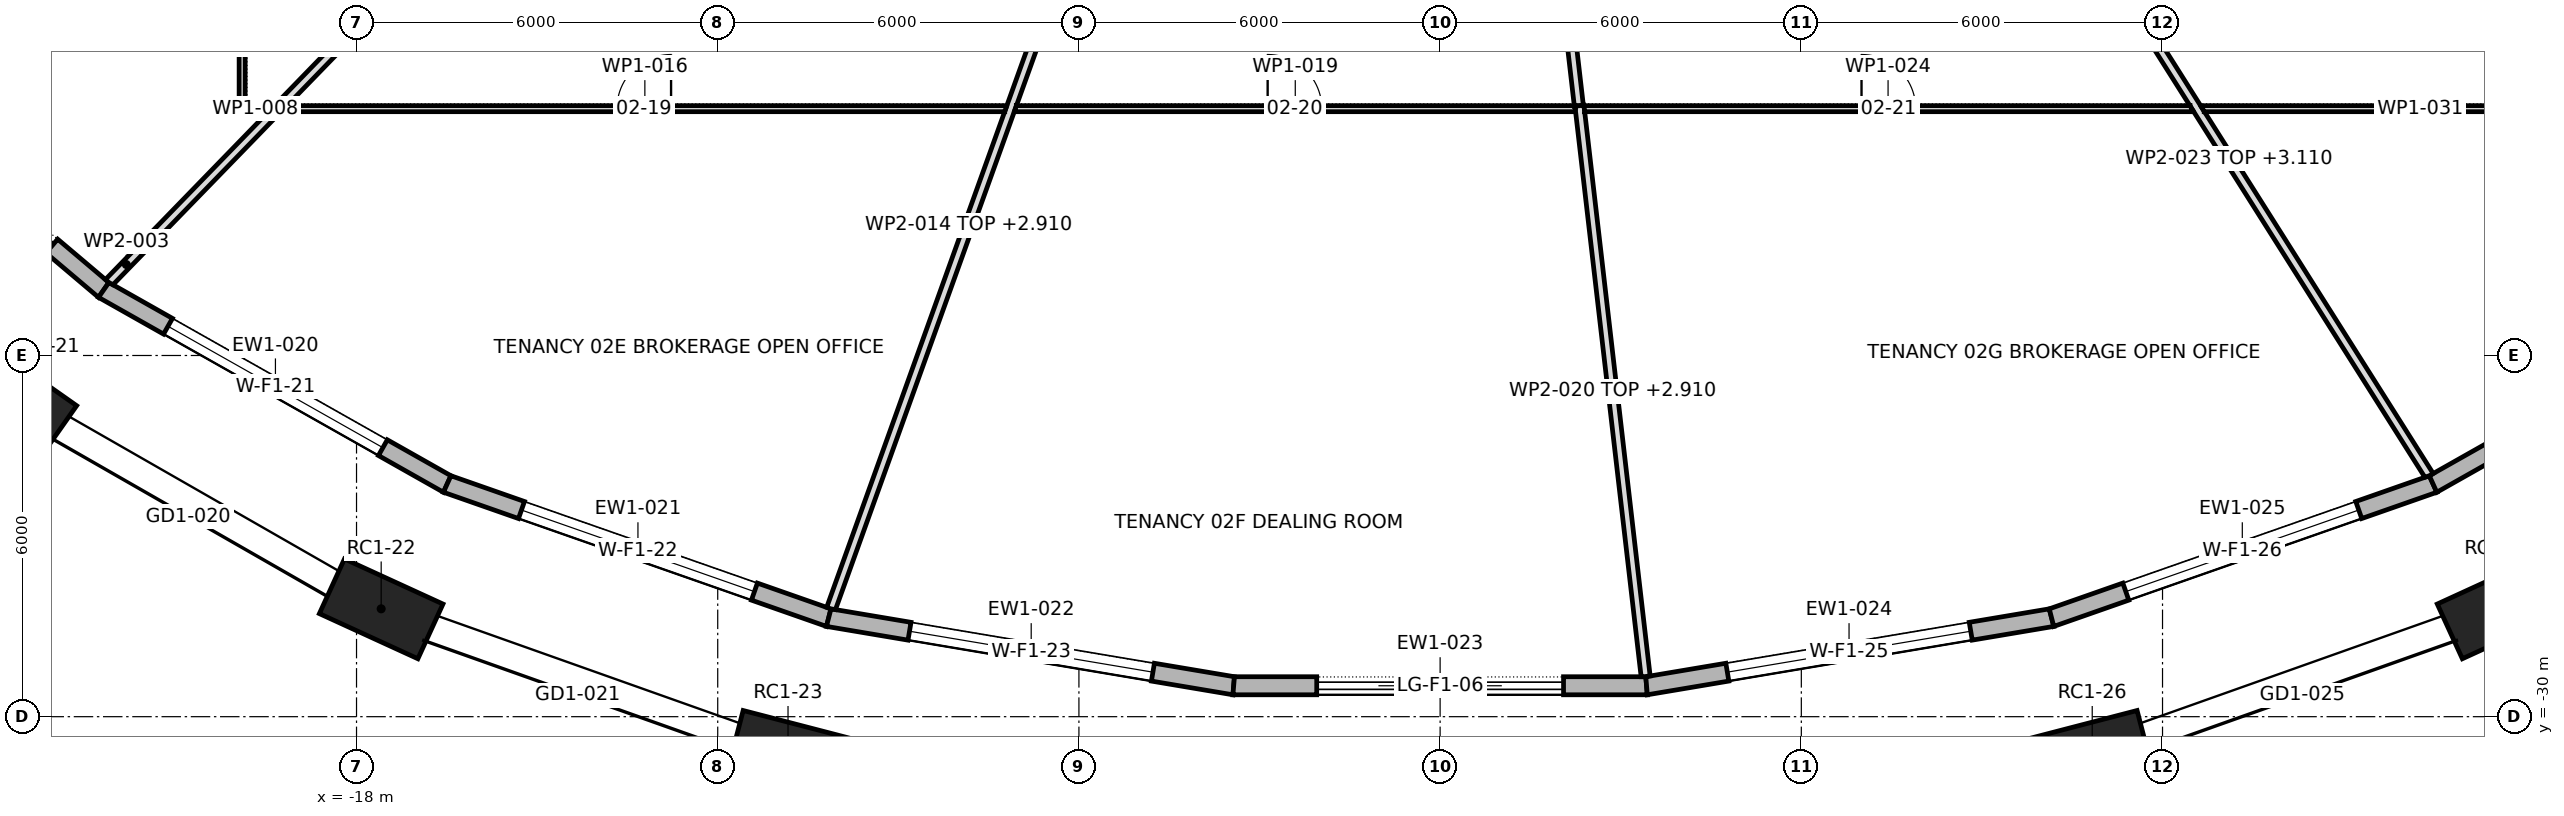
"""IFC4 building model, lengths in metres.
Left out: names, types, materials, properties, quantities, classifications, styles, units other than length and angle.
Written with IfcOpenShell. Run it as: python <this file> out.ifc"""

import sys

from ifc_helpers import new_model, si_unit, direction, frame, frame_2d, origin, origin_2d, place, context, subcontext, project, spatial, polyline, rectangle, outline, extrude, element, fill, save


model = new_model("IFC4")
c1 = context("Model", 3, precision=1e-05, world=origin(), true_north=direction((0.0, 1.0)))
c2 = subcontext(c1, "Body", "Model", "MODEL_VIEW")
j1 = project(units=[si_unit("LENGTHUNIT", "METRE"), si_unit("PLANEANGLEUNIT", "RADIAN")], contexts=[c1])
p1 = place(None, origin())
s1 = spatial("IfcSite", under=j1, at=p1, CompositionType="ELEMENT")
p2 = place(p1, origin())
s2 = spatial("IfcBuilding", under=s1, at=p2, CompositionType="ELEMENT")
p3 = place(p2, frame((0.0, 0.0, 44.5)))
s3 = spatial("IfcBuildingStorey", under=s2, at=p3, CompositionType="ELEMENT", Elevation=44.5)
for number, where, z_axis, x_axis in (
    (1, (-23.673, -24.725, 0.0), (0.0, 0.0, 1.0), (0.818, -0.575, 0.0)),
    (2, (-17.591, -28.208, 0.0), (0.0, 0.0, 1.0), (0.909, -0.417, 0.0)),
    (3, (-10.832, -30.608, 0.0), (0.0, 0.0, 1.0), (0.968, -0.252, 0.0)),
    (4, (10.832, -30.608, 0.0), (0.0, 0.0, 1.0), (0.968, 0.252, 0.0)),
    (5, (17.591, -28.208, 0.0), (0.0, 0.0, 1.0), (0.909, 0.417, 0.0)),
):
    element("IfcColumn", number, at=place(p3, frame(where, z_axis=z_axis, x_axis=x_axis)), inside=s3, PredefinedType="COLUMN", context=c2, shape_type="SweptSolid", body=[
        extrude(rectangle(XDim=1.8, YDim=1.0, at=origin_2d()), origin(), (0.0, 0.0, 1.0), 4.2),
    ])
p4 = place(p3, frame((-27.054, -18.806, 0.0), z_axis=(0.0, 0.0, 1.0), x_axis=(0.763577077796, -0.645716691951, 0.0)))
e6 = element("IfcWall", 6, at=p4, inside=s3, PredefinedType="STANDARD", context=c2, shape_type="SweptSolid", body=[
    extrude(outline(polyline([(-0.015, -0.15), (6.371, -0.15), (6.343, 0.15), (0.015, 0.15), (-0.015, -0.15)])), origin(), (0.0, 0.0, 1.0), 3.9),
])
p5 = place(p4, frame((1.129, 0.0, 0.0)))
e7 = element("IfcOpeningElement", 7, at=p5, cuts=e6, PredefinedType="OPENING", context=c2, shape_type="SweptSolid", body=[
    extrude(rectangle(XDim=4.1, YDim=3.45, at=frame_2d((2.05, 1.725))), frame((0.0, 0.162, 0.0), z_axis=(0.0, -1.0, 0.0), x_axis=(1.0, 0.0, 0.0)), (0.0, 0.0, 1.0), 0.324),
])
p6 = place(p3, frame((-22.2, -22.911, 0.0), z_axis=(0.0, 0.0, 1.0), x_axis=(0.87061279013, -0.491968870623, 0.0)))
e8 = element("IfcWall", 8, at=p6, inside=s3, PredefinedType="STANDARD", context=c2, shape_type="SweptSolid", body=[
    extrude(outline(polyline([(-0.014, -0.15), (6.567, -0.15), (6.54, 0.15), (0.014, 0.15), (-0.014, -0.15)])), origin(), (0.0, 0.0, 1.0), 3.9),
])
p7 = place(p6, frame((1.227, 0.0, 0.6)))
e9 = element("IfcOpeningElement", 9, at=p7, cuts=e8, PredefinedType="OPENING", context=c2, shape_type="SweptSolid", body=[
    extrude(rectangle(XDim=4.1, YDim=2.85, at=frame_2d((2.05, 1.425))), frame((0.0, 0.162, 0.0), z_axis=(0.0, -1.0, 0.0), x_axis=(1.0, 0.0, 0.0)), (0.0, 0.0, 1.0), 0.324),
])
p8 = place(p3, frame((-16.494, -26.135, 0.0), z_axis=(0.0, 0.0, 1.0), x_axis=(0.943778979427, -0.330577128657, 0.0)))
e10 = element("IfcWall", 10, at=p8, inside=s3, PredefinedType="STANDARD", context=c2, shape_type="SweptSolid", body=[
    extrude(outline(polyline([(-0.013, -0.15), (6.728, -0.15), (6.703, 0.15), (0.013, 0.15), (-0.013, -0.15)])), origin(), (0.0, 0.0, 1.0), 3.9),
])
p9 = place(p8, frame((1.308, 0.0, 0.6)))
e11 = element("IfcOpeningElement", 11, at=p9, cuts=e10, PredefinedType="OPENING", context=c2, shape_type="SweptSolid", body=[
    extrude(rectangle(XDim=4.1, YDim=2.85, at=frame_2d((2.05, 1.425))), frame((0.0, 0.162, 0.0), z_axis=(0.0, -1.0, 0.0), x_axis=(1.0, 0.0, 0.0)), (0.0, 0.0, 1.0), 0.324),
])
p10 = place(p3, frame((-10.156, -28.355, 0.0), z_axis=(0.0, 0.0, 1.0), x_axis=(0.986145179906, -0.165884550659, 0.0)))
e12 = element("IfcWall", 12, at=p10, inside=s3, PredefinedType="STANDARD", context=c2, shape_type="SweptSolid", body=[
    extrude(outline(polyline([(-0.013, -0.15), (6.834, -0.15), (6.809, 0.15), (0.013, 0.15), (-0.013, -0.15)])), origin(), (0.0, 0.0, 1.0), 3.9),
])
p11 = place(p10, frame((1.361, 0.0, 0.6)))
e13 = element("IfcOpeningElement", 13, at=p11, cuts=e12, PredefinedType="OPENING", context=c2, shape_type="SweptSolid", body=[
    extrude(rectangle(XDim=4.1, YDim=2.85, at=frame_2d((2.05, 1.425))), frame((0.0, 0.162, 0.0), z_axis=(0.0, -1.0, 0.0), x_axis=(1.0, 0.0, 0.0)), (0.0, 0.0, 1.0), 0.324),
])
p12 = place(p3, frame((-3.429, -29.486, 0.0), z_axis=(0.0, 0.0, 1.0), x_axis=(1.0, 0.0, 0.0)))
e14 = element("IfcWall", 14, at=p12, inside=s3, PredefinedType="STANDARD", context=c2, shape_type="SweptSolid", body=[
    extrude(outline(polyline([(-0.012, -0.15), (6.871, -0.15), (6.846, 0.15), (0.012, 0.15), (-0.012, -0.15)])), origin(), (0.0, 0.0, 1.0), 3.9),
])
p13 = place(p12, frame((1.379, 0.0, 0.0)))
e15 = element("IfcOpeningElement", 15, at=p13, cuts=e14, PredefinedType="OPENING", context=c2, shape_type="SweptSolid", body=[
    extrude(rectangle(XDim=4.1, YDim=3.45, at=frame_2d((2.05, 1.725))), frame((0.0, 0.162, 0.0), z_axis=(0.0, -1.0, 0.0), x_axis=(1.0, 0.0, 0.0)), (0.0, 0.0, 1.0), 0.324),
])
p14 = place(p3, frame((3.429, -29.486, 0.0), z_axis=(0.0, 0.0, 1.0), x_axis=(0.986145179906, 0.165884550659, 0.0)))
e16 = element("IfcWall", 16, at=p14, inside=s3, PredefinedType="STANDARD", context=c2, shape_type="SweptSolid", body=[
    extrude(outline(polyline([(-0.012, -0.15), (6.834, -0.15), (6.809, 0.15), (0.012, 0.15), (-0.012, -0.15)])), origin(), (0.0, 0.0, 1.0), 3.9),
])
p15 = place(p14, frame((1.361, 0.0, 0.6)))
e17 = element("IfcOpeningElement", 17, at=p15, cuts=e16, PredefinedType="OPENING", context=c2, shape_type="SweptSolid", body=[
    extrude(rectangle(XDim=4.1, YDim=2.85, at=frame_2d((2.05, 1.425))), frame((0.0, 0.162, 0.0), z_axis=(0.0, -1.0, 0.0), x_axis=(1.0, 0.0, 0.0)), (0.0, 0.0, 1.0), 0.324),
])
p16 = place(p3, frame((10.156, -28.355, 0.0), z_axis=(0.0, 0.0, 1.0), x_axis=(0.943778979427, 0.330577128657, 0.0)))
e18 = element("IfcWall", 18, at=p16, inside=s3, PredefinedType="STANDARD", context=c2, shape_type="SweptSolid", body=[
    extrude(outline(polyline([(-0.013, -0.15), (6.729, -0.15), (6.702, 0.15), (0.013, 0.15), (-0.013, -0.15)])), origin(), (0.0, 0.0, 1.0), 3.9),
])
p17 = place(p16, frame((1.308, 0.0, 0.6)))
e19 = element("IfcOpeningElement", 19, at=p17, cuts=e18, PredefinedType="OPENING", context=c2, shape_type="SweptSolid", body=[
    extrude(rectangle(XDim=4.1, YDim=2.85, at=frame_2d((2.05, 1.425))), frame((0.0, 0.162, 0.0), z_axis=(0.0, -1.0, 0.0), x_axis=(1.0, 0.0, 0.0)), (0.0, 0.0, 1.0), 0.324),
])
p18 = place(p3, frame((16.494, -26.135, 0.0), z_axis=(0.0, 0.0, 1.0), x_axis=(0.87061279013, 0.491968870623, 0.0)))
e20 = element("IfcWall", 20, at=p18, inside=s3, PredefinedType="STANDARD", context=c2, shape_type="SweptSolid", body=[
    extrude(outline(polyline([(-0.013, -0.15), (6.568, -0.15), (6.539, 0.15), (0.013, 0.15), (-0.013, -0.15)])), origin(), (0.0, 0.0, 1.0), 3.9),
])
p19 = place(p18, frame((1.227, 0.0, 0.6)))
e21 = element("IfcOpeningElement", 21, at=p19, cuts=e20, PredefinedType="OPENING", context=c2, shape_type="SweptSolid", body=[
    extrude(rectangle(XDim=4.1, YDim=2.85, at=frame_2d((2.05, 1.425))), frame((0.0, 0.162, 0.0), z_axis=(0.0, -1.0, 0.0), x_axis=(1.0, 0.0, 0.0)), (0.0, 0.0, 1.0), 0.324),
])
p20 = place(p3, frame((-22.117, -22.791, 0.0), z_axis=(0.0, 0.0, 1.0), x_axis=(0.696613128163, 0.717446966452, 0.0)))
e22 = element("IfcWall", 22, at=p20, inside=s3, PredefinedType="PARTITIONING", context=c2, shape_type="SweptSolid", body=[
    extrude(outline(polyline([(0.0, 0.075), (0.0, 0.071), (0.005, 0.0), (0.025, -0.075), (0.832, -0.075), (0.832, 0.075), (0.0, 0.075)])), origin(), (0.0, 0.0, 1.0), 3.9),
])
p21 = place(p3, frame((-19.9, -19.95, 0.0), z_axis=(0.0, 0.0, 1.0), x_axis=(0.0, 1.0, 0.0)))
e23 = element("IfcWall", 23, at=p21, inside=s3, PredefinedType="PARTITIONING", context=c2, shape_type="SweptSolid", body=[
    extrude(outline(polyline([(10.9, -0.05), (10.9, -0.049), (10.892, -0.031), (10.883, -0.034), (10.845, 0.05), (9.038, 0.05), (7.23, 0.05), (5.423, 0.05), (3.615, 0.05), (1.808, 0.05), (0.0, 0.05), (0.1, -0.05), (0.1, -0.05), (1.9, -0.05), (3.7, -0.05), (5.5, -0.05), (7.3, -0.05), (9.1, -0.05), (10.9, -0.05)])), origin(), (0.0, 0.0, 1.0), 3.9),
])
p22 = place(p21, frame((5.05, 0.0, 0.0)))
e24 = element("IfcOpeningElement", 24, at=p22, cuts=e23, PredefinedType="OPENING", context=c2, shape_type="SweptSolid", body=[
    extrude(rectangle(XDim=0.9, YDim=2.1, at=frame_2d((0.45, 1.05))), frame((0.0, 0.062, 0.0), z_axis=(0.0, -1.0, 0.0), x_axis=(1.0, 0.0, 0.0)), (0.0, 0.0, 1.0), 0.124),
])
p23 = place(p3, frame((-19.46, -19.9, 0.0), z_axis=(0.0, 0.0, 1.0), x_axis=(-1.0, 0.0, 0.0)))
e25 = element("IfcWall", 25, at=p23, inside=s3, PredefinedType="PARTITIONING", context=c2, shape_type="SweptSolid", body=[
    extrude(outline(polyline([(0.0, -0.05), (0.39, -0.05), (0.49, 0.05), (0.0, 0.05), (0.0, -0.05)])), origin(), (0.0, 0.0, 1.0), 3.9),
])
p24 = place(p3, frame((-10.119, -28.209, 0.0), z_axis=(0.0, 0.0, 1.0), x_axis=(0.337949016046, 0.941164418448, 0.0)))
e26 = element("IfcWall", 26, at=p24, inside=s3, PredefinedType="PARTITIONING", context=c2, shape_type="SweptSolid", body=[
    extrude(outline(polyline([(0.014, -0.075), (1.792, -0.075), (3.57, -0.075), (5.347, -0.075), (7.125, -0.075), (8.903, -0.075), (8.908, -0.073), (8.909, -0.075), (10.458, -0.075), (12.008, -0.075), (13.557, -0.075), (13.557, -0.074), (13.555, -0.069), (13.555, -0.069), (13.503, 0.075), (11.919, 0.075), (10.335, 0.075), (8.751, 0.075), (8.749, 0.074), (8.749, 0.075), (6.999, 0.075), (5.249, 0.075), (3.5, 0.075), (1.75, 0.075), (0.0, 0.075), (0.0, 0.071), (0.0, -0.0), (0.014, -0.075)])), origin(), (0.0, 0.0, 1.0), 2.91),
])
p25 = place(p3, frame((-7.198, -19.9, 0.0), z_axis=(0.0, 0.0, 1.0), x_axis=(-1.0, 0.0, 0.0)))
e27 = element("IfcWall", 27, at=p25, inside=s3, PredefinedType="PARTITIONING", context=c2, shape_type="SweptSolid", body=[
    extrude(outline(polyline([(0.0, -0.05), (1.993, -0.05), (3.986, -0.05), (5.979, -0.05), (7.972, -0.05), (9.965, -0.05), (11.958, -0.05), (12.055, 0.05), (12.055, 0.05), (10.338, 0.05), (8.621, 0.05), (6.904, 0.05), (5.187, 0.05), (3.47, 0.05), (1.753, 0.05), (0.035, 0.05), (0.0, -0.049), (0.0, -0.05)])), origin(), (0.0, 0.0, 1.0), 3.9),
])
p26 = place(p25, frame((5.577, 0.0, 0.0)))
e28 = element("IfcOpeningElement", 28, at=p26, cuts=e27, PredefinedType="OPENING", context=c2, shape_type="SweptSolid", body=[
    extrude(rectangle(XDim=0.9, YDim=2.1, at=frame_2d((0.45, 1.05))), frame((0.0, 0.062, 0.0), z_axis=(0.0, -1.0, 0.0), x_axis=(1.0, 0.0, 0.0)), (0.0, 0.0, 1.0), 0.124),
])
p27 = place(p3, frame((1.798, -15.467, 0.0), z_axis=(0.0, 0.0, 1.0), x_axis=(0.114783679138, -0.993390510828, 0.0)))
e29 = element("IfcWall", 29, at=p27, inside=s3, PredefinedType="PARTITIONING", context=c2, shape_type="SweptSolid", body=[
    extrude(outline(polyline([(0.0, -0.075), (1.468, -0.075), (2.936, -0.075), (4.404, -0.075), (4.404, -0.075), (4.407, -0.075), (4.413, -0.075), (4.413, 0.075), (2.948, 0.075), (1.483, 0.075), (0.017, 0.075), (0.0, -0.073), (0.0, -0.075)])), origin(), (0.0, 0.0, 1.0), 2.91),
])
p28 = place(p3, frame((2.25, -19.9, 0.0), z_axis=(0.0, 0.0, 1.0), x_axis=(-1.0, 0.0, 0.0)))
e30 = element("IfcWall", 30, at=p28, inside=s3, PredefinedType="PARTITIONING", context=c2, shape_type="SweptSolid", body=[
    extrude(outline(polyline([(0.021, -0.05), (1.875, -0.05), (3.728, -0.05), (5.581, -0.05), (7.435, -0.05), (9.288, -0.05), (9.324, 0.05), (9.324, 0.05), (7.459, 0.05), (5.594, 0.05), (3.729, 0.05), (1.865, 0.05), (0.0, 0.05), (0.0, 0.047), (0.01, -0.041), (0.0, -0.042), (0.0, -0.043), (0.02, -0.041), (0.021, -0.05)])), origin(), (0.0, 0.0, 1.0), 3.9),
])
p29 = place(p28, frame((4.215, 0.0, 0.0)))
e31 = element("IfcOpeningElement", 31, at=p29, cuts=e30, PredefinedType="OPENING", context=c2, shape_type="SweptSolid", body=[
    extrude(rectangle(XDim=0.9, YDim=2.1, at=frame_2d((0.45, 1.05))), frame((0.0, 0.062, 0.0), z_axis=(0.0, -1.0, 0.0), x_axis=(1.0, 0.0, 0.0)), (0.0, 0.0, 1.0), 0.124),
])
p30 = place(p3, frame((2.314, -19.85, 0.0), z_axis=(0.0, 0.0, 1.0), x_axis=(0.115247328534, -0.9933368277, 0.0)))
e32 = element("IfcWall", 32, at=p30, inside=s3, PredefinedType="PARTITIONING", context=c2, shape_type="SweptSolid", body=[
    extrude(outline(polyline([(0.089, -0.075), (1.979, -0.075), (3.87, -0.075), (5.76, -0.075), (7.65, -0.075), (9.541, -0.075), (9.546, -0.034), (9.546, 0.075), (7.658, 0.075), (5.771, 0.075), (3.884, 0.075), (1.996, 0.075), (0.109, 0.075), (0.109, 0.074), (0.098, 0.075), (0.0, 0.075), (0.0, -0.065), (0.089, -0.075)])), origin(), (0.0, 0.0, 1.0), 2.91),
])
p31 = place(p3, frame((9.752, -15.435, 0.0), z_axis=(0.0, 0.0, 1.0), x_axis=(0.534413972524, -0.845222873549, 0.0)))
e33 = element("IfcWall", 33, at=p31, inside=s3, PredefinedType="PARTITIONING", context=c2, shape_type="SweptSolid", body=[
    extrude(outline(polyline([(0.0, -0.075), (1.725, -0.075), (3.451, -0.075), (5.176, -0.075), (5.177, -0.073), (5.181, -0.075), (7.005, -0.075), (8.83, -0.075), (10.655, -0.075), (12.48, -0.075), (12.497, 0.001), (12.5, 0.064), (12.5, 0.075), (10.723, 0.075), (8.945, 0.075), (7.167, 0.075), (5.389, 0.075), (5.387, 0.072), (5.383, 0.075), (3.62, 0.075), (1.858, 0.075), (0.095, 0.075), (0.0, -0.075), (0.0, -0.075)])), origin(), (0.0, 0.0, 1.0), 3.11),
])
p32 = place(p3, frame((12.518, -19.9, 0.0), z_axis=(0.0, 0.0, 1.0), x_axis=(-1.0, 0.0, 0.0)))
e34 = element("IfcWall", 34, at=p32, inside=s3, PredefinedType="PARTITIONING", context=c2, shape_type="SweptSolid", body=[
    extrude(outline(polyline([(10.128, -0.05), (10.128, -0.048), (10.117, 0.05), (8.431, 0.05), (6.745, 0.05), (5.058, 0.05), (3.372, 0.05), (1.686, 0.05), (0.0, 0.05), (0.0, 0.05), (0.063, -0.05), (1.741, -0.05), (3.418, -0.05), (5.096, -0.05), (6.773, -0.05), (8.451, -0.05), (10.128, -0.05)])), origin(), (0.0, 0.0, 1.0), 3.9),
])
p33 = place(p32, frame((4.618, 0.0, 0.0)))
e35 = element("IfcOpeningElement", 35, at=p33, cuts=e34, PredefinedType="OPENING", context=c2, shape_type="SweptSolid", body=[
    extrude(rectangle(XDim=0.9, YDim=2.1, at=frame_2d((0.45, 1.05))), frame((0.0, 0.062, 0.0), z_axis=(0.0, -1.0, 0.0), x_axis=(1.0, 0.0, 0.0)), (0.0, 0.0, 1.0), 0.124),
])
p34 = place(p3, frame((19.95, -19.9, 0.0), z_axis=(0.0, 0.0, 1.0), x_axis=(-1.0, 0.0, 0.0)))
e36 = element("IfcWall", 36, at=p34, inside=s3, PredefinedType="PARTITIONING", context=c2, shape_type="SweptSolid", body=[
    extrude(outline(polyline([(7.317, -0.05), (7.317, -0.05), (7.254, 0.05), (5.441, 0.05), (3.627, 0.05), (1.813, 0.05), (0.0, 0.05), (0.1, -0.05), (0.1, -0.05), (1.904, -0.05), (3.709, -0.05), (5.513, -0.05), (7.317, -0.05)])), origin(), (0.0, 0.0, 1.0), 3.9),
])
p35 = place(p3, frame((-21.537, -22.194, 0.0), z_axis=(0.0, 0.0, 1.0), x_axis=(0.696644213118, 0.71741678286, 0.0)))
e37 = element("IfcWall", 37, at=p35, inside=s3, PredefinedType="PARTITIONING", context=c2, shape_type="SweptSolid", body=[
    extrude(outline(polyline([(0.0, -0.075), (1.667, -0.075), (3.335, -0.075), (3.337, -0.073), (3.34, -0.075), (4.864, -0.075), (6.389, -0.075), (7.913, -0.075), (9.438, -0.075), (9.438, -0.074), (9.345, 0.021), (9.345, 0.021), (9.292, 0.075), (7.734, 0.075), (6.176, 0.075), (4.617, 0.075), (3.059, 0.075), (3.057, 0.073), (3.055, 0.075), (1.527, 0.075), (0.0, 0.075), (0.0, -0.075)])), origin(), (0.0, 0.0, 1.0), 3.147),
])
p36 = place(p5, origin())
e38 = element("IfcDoor", 38, at=p36, inside=s3, OperationType="DOUBLE_DOOR_SLIDING", PredefinedType="DOOR", context=c2, shape_type="SweptSolid", body=[
    extrude(rectangle(XDim=4.1, YDim=3.45, at=frame_2d((2.05, 1.725))), frame((0.0, 0.025, 0.0), z_axis=(0.0, -1.0, 0.0), x_axis=(1.0, 0.0, 0.0)), (0.0, 0.0, 1.0), 0.05),
])
fill(e7, e38)
p37 = place(p7, origin())
e39 = element("IfcWindow", 39, at=p37, inside=s3, PartitioningType="TRIPLE_PANEL_VERTICAL", PredefinedType="WINDOW", context=c2, shape_type="SweptSolid", body=[
    extrude(rectangle(XDim=4.1, YDim=2.85, at=frame_2d((2.05, 1.425))), frame((0.0, 0.03, 0.0), z_axis=(0.0, -1.0, 0.0), x_axis=(1.0, 0.0, 0.0)), (0.0, 0.0, 1.0), 0.06),
])
fill(e9, e39)
p38 = place(p9, origin())
e40 = element("IfcWindow", 40, at=p38, inside=s3, PartitioningType="TRIPLE_PANEL_VERTICAL", PredefinedType="WINDOW", context=c2, shape_type="SweptSolid", body=[
    extrude(rectangle(XDim=4.1, YDim=2.85, at=frame_2d((2.05, 1.425))), frame((0.0, 0.03, 0.0), z_axis=(0.0, -1.0, 0.0), x_axis=(1.0, 0.0, 0.0)), (0.0, 0.0, 1.0), 0.06),
])
fill(e11, e40)
p39 = place(p11, origin())
e41 = element("IfcWindow", 41, at=p39, inside=s3, PartitioningType="TRIPLE_PANEL_VERTICAL", PredefinedType="WINDOW", context=c2, shape_type="SweptSolid", body=[
    extrude(rectangle(XDim=4.1, YDim=2.85, at=frame_2d((2.05, 1.425))), frame((0.0, 0.03, 0.0), z_axis=(0.0, -1.0, 0.0), x_axis=(1.0, 0.0, 0.0)), (0.0, 0.0, 1.0), 0.06),
])
fill(e13, e41)
p40 = place(p13, origin())
e42 = element("IfcDoor", 42, at=p40, inside=s3, OperationType="DOUBLE_DOOR_SLIDING", PredefinedType="DOOR", context=c2, shape_type="SweptSolid", body=[
    extrude(rectangle(XDim=4.1, YDim=3.45, at=frame_2d((2.05, 1.725))), frame((0.0, 0.025, 0.0), z_axis=(0.0, -1.0, 0.0), x_axis=(1.0, 0.0, 0.0)), (0.0, 0.0, 1.0), 0.05),
])
fill(e15, e42)
p41 = place(p15, origin())
e43 = element("IfcWindow", 43, at=p41, inside=s3, PartitioningType="TRIPLE_PANEL_VERTICAL", PredefinedType="WINDOW", context=c2, shape_type="SweptSolid", body=[
    extrude(rectangle(XDim=4.1, YDim=2.85, at=frame_2d((2.05, 1.425))), frame((0.0, 0.03, 0.0), z_axis=(0.0, -1.0, 0.0), x_axis=(1.0, 0.0, 0.0)), (0.0, 0.0, 1.0), 0.06),
])
fill(e17, e43)
p42 = place(p17, origin())
e44 = element("IfcWindow", 44, at=p42, inside=s3, PartitioningType="TRIPLE_PANEL_VERTICAL", PredefinedType="WINDOW", context=c2, shape_type="SweptSolid", body=[
    extrude(rectangle(XDim=4.1, YDim=2.85, at=frame_2d((2.05, 1.425))), frame((0.0, 0.03, 0.0), z_axis=(0.0, -1.0, 0.0), x_axis=(1.0, 0.0, 0.0)), (0.0, 0.0, 1.0), 0.06),
])
fill(e19, e44)
p43 = place(p26, frame((0.9, 0.0, 0.0), z_axis=(0.0, 0.0, 1.0), x_axis=(-1.0, 0.0, 0.0)))
e45 = element("IfcDoor", 45, at=p43, inside=s3, OperationType="SINGLE_SWING_LEFT", PredefinedType="DOOR", context=c2, shape_type="SweptSolid", body=[
    extrude(rectangle(XDim=0.9, YDim=2.1, at=frame_2d((0.45, 1.05))), frame((0.0, 0.025, 0.0), z_axis=(0.0, -1.0, 0.0), x_axis=(1.0, 0.0, 0.0)), (0.0, 0.0, 1.0), 0.05),
])
fill(e28, e45)
p44 = place(p29, frame((0.9, 0.0, 0.0), z_axis=(0.0, 0.0, 1.0), x_axis=(-1.0, 0.0, 0.0)))
e46 = element("IfcDoor", 46, at=p44, inside=s3, OperationType="SINGLE_SWING_RIGHT", PredefinedType="DOOR", context=c2, shape_type="SweptSolid", body=[
    extrude(rectangle(XDim=0.9, YDim=2.1, at=frame_2d((0.45, 1.05))), frame((0.0, 0.025, 0.0), z_axis=(0.0, -1.0, 0.0), x_axis=(1.0, 0.0, 0.0)), (0.0, 0.0, 1.0), 0.05),
])
fill(e31, e46)
p45 = place(p33, frame((0.9, 0.0, 0.0), z_axis=(0.0, 0.0, 1.0), x_axis=(-1.0, 0.0, 0.0)))
e47 = element("IfcDoor", 47, at=p45, inside=s3, OperationType="SINGLE_SWING_RIGHT", PredefinedType="DOOR", context=c2, shape_type="SweptSolid", body=[
    extrude(rectangle(XDim=0.9, YDim=2.1, at=frame_2d((0.45, 1.05))), frame((0.0, 0.025, 0.0), z_axis=(0.0, -1.0, 0.0), x_axis=(1.0, 0.0, 0.0)), (0.0, 0.0, 1.0), 0.05),
])
fill(e35, e47)
save(model, sys.argv[1])
